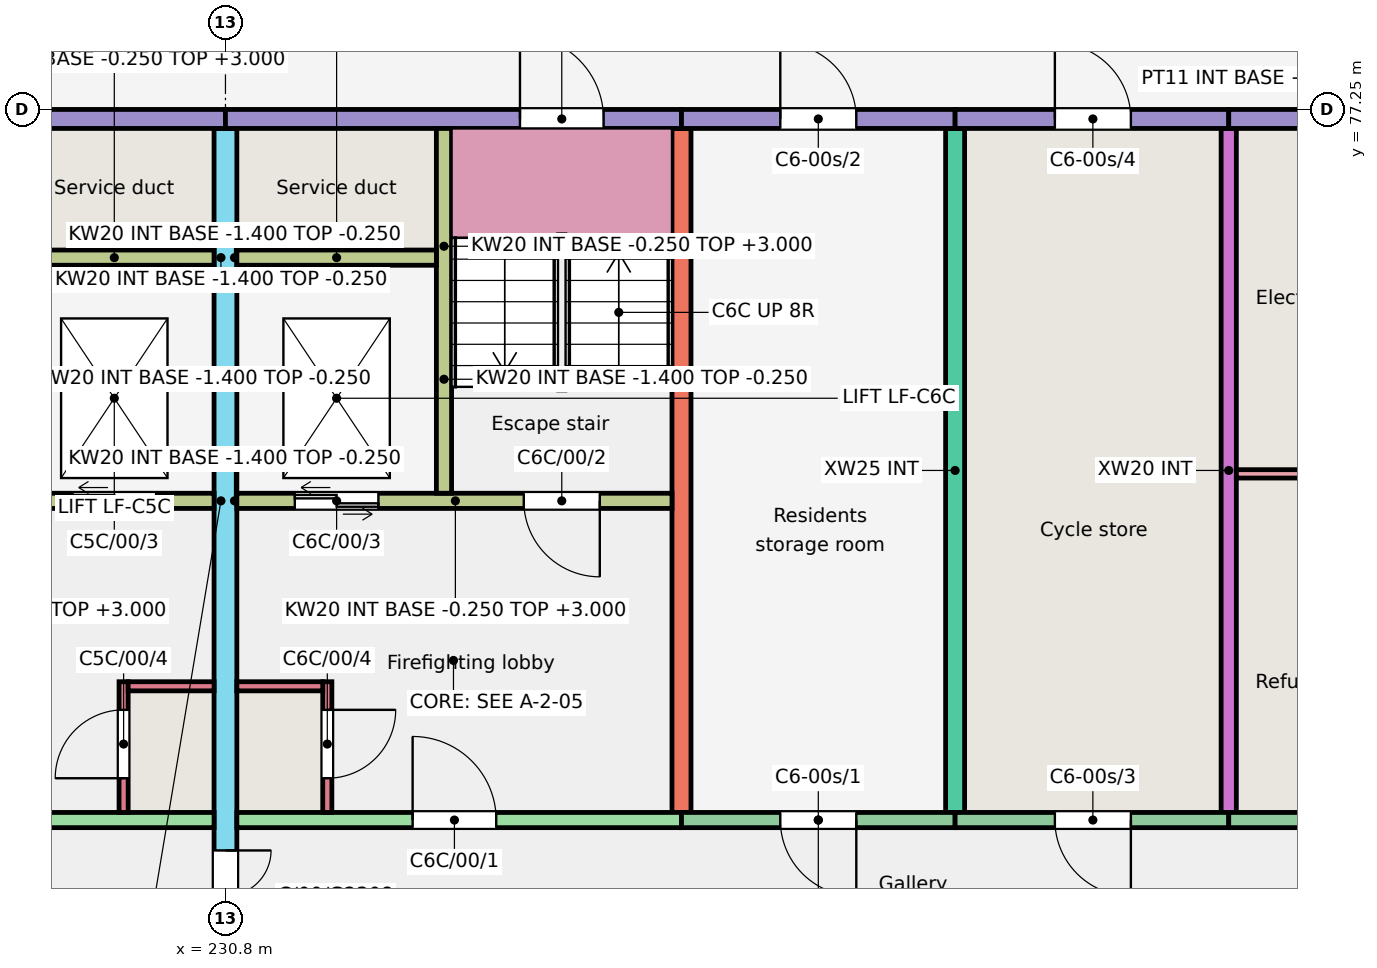
"""IFC4 building model, lengths in metres.
Left out: names, types, materials, properties, quantities, classifications, styles, units other than length and angle.
Written with IfcOpenShell. Run it as: python <this file> out.ifc"""

import sys

from ifc_helpers import new_model, si_unit, direction, frame, frame_2d, origin, place, context, subcontext, project, spatial, rectangle, extrude, element, fill, save


model = new_model("IFC4")
c1 = context("Model", 3, precision=1e-05, world=origin(), true_north=direction((0.0, 1.0)))
c2 = subcontext(c1, "Body", "Model", "MODEL_VIEW")
j1 = project(units=[si_unit("LENGTHUNIT", "METRE"), si_unit("PLANEANGLEUNIT", "RADIAN")], contexts=[c1])
p1 = place(None, origin())
s1 = spatial("IfcSite", under=j1, at=p1, CompositionType="ELEMENT")
p2 = place(p1, origin())
s2 = spatial("IfcBuilding", under=s1, at=p2, CompositionType="ELEMENT")
p3 = place(p2, origin())
s3 = spatial("IfcBuildingStorey", under=s2, at=p3, CompositionType="ELEMENT", Elevation=0.0)
p4 = place(p3, frame((230.8, 66.0, -0.25), z_axis=(0.0, 0.0, 1.0), x_axis=(0.0, 1.0, 0.0)))
e1 = element("IfcWall", 1, at=p4, inside=s3, PredefinedType="SHEAR", context=c2, shape_type="SweptSolid", body=[
    extrude(rectangle(XDim=11.0, YDim=0.3, at=frame_2d((5.5, 0.0))), origin(), (0.0, 0.0, 1.0), 3.25),
])
p5 = place(p4, frame((0.3, 0.0, 0.25)))
e2 = element("IfcOpeningElement", 2, at=p5, cuts=e1, PredefinedType="OPENING", context=c2, shape_type="SweptSolid", body=[
    extrude(rectangle(XDim=1.2, YDim=2.1, at=frame_2d((0.6, 1.05))), frame((0.0, 0.16, 0.0), z_axis=(0.0, -1.0, 0.0), x_axis=(1.0, 0.0, 0.0)), (0.0, 0.0, 1.0), 0.32),
])
for number, where, z_axis, x_axis in (
    (3, (236.8, 68.0, -0.25), (0.0, 0.0, 1.0), (0.0, 1.0, 0.0)),
    (4, (240.4, 68.0, -0.25), (0.0, 0.0, 1.0), (0.0, 1.0, 0.0)),
):
    element("IfcWall", number, at=place(p3, frame(where, z_axis=z_axis, x_axis=x_axis)), inside=s3, PredefinedType="SHEAR", context=c2, shape_type="SweptSolid", body=[
        extrude(rectangle(XDim=9.0, YDim=0.25, at=frame_2d((4.5, 0.0))), origin(), (0.0, 0.0, 1.0), 3.25),
    ])
p6 = place(p3, frame((244.0, 68.0, -0.25), z_axis=(0.0, 0.0, 1.0), x_axis=(0.0, 1.0, 0.0)))
e5 = element("IfcWall", 5, at=p6, inside=s3, PredefinedType="SHEAR", context=c2, shape_type="SweptSolid", body=[
    extrude(rectangle(XDim=9.0, YDim=0.2, at=frame_2d((4.5, 0.0))), origin(), (0.0, 0.0, 1.0), 3.25),
])
p7 = place(p3, frame((224.8, 77.125, -0.25), z_axis=(0.0, 0.0, 1.0), x_axis=(1.0, 0.0, 0.0)))
e6 = element("IfcWall", 6, at=p7, inside=s3, PredefinedType="SOLIDWALL", context=c2, shape_type="SweptSolid", body=[
    extrude(rectangle(XDim=6.0, YDim=0.25, at=frame_2d((3.0, 0.0))), origin(), (0.0, 0.0, 1.0), 3.25),
])
p8 = place(p7, frame((1.025, 0.0, 0.25)))
e7 = element("IfcOpeningElement", 7, at=p8, cuts=e6, PredefinedType="OPENING", context=c2, shape_type="SweptSolid", body=[
    extrude(rectangle(XDim=1.1, YDim=2.1, at=frame_2d((0.55, 1.05))), frame((0.0, 0.135, 0.0), z_axis=(0.0, -1.0, 0.0), x_axis=(1.0, 0.0, 0.0)), (0.0, 0.0, 1.0), 0.27),
])
p9 = place(p3, frame((224.8, 67.9, -0.25), z_axis=(0.0, 0.0, 1.0), x_axis=(1.0, 0.0, 0.0)))
e8 = element("IfcWall", 8, at=p9, inside=s3, PredefinedType="SHEAR", context=c2, shape_type="SweptSolid", body=[
    extrude(rectangle(XDim=5.85, YDim=0.2, at=frame_2d((2.925, 0.0))), origin(), (0.0, 0.0, 1.0), 3.25),
])
p10 = place(p9, frame((2.438, 0.0, 0.25)))
e9 = element("IfcOpeningElement", 9, at=p10, cuts=e8, PredefinedType="OPENING", context=c2, shape_type="SweptSolid", body=[
    extrude(rectangle(XDim=1.1, YDim=2.1, at=frame_2d((0.55, 1.05))), frame((0.0, 0.11, 0.0), z_axis=(0.0, -1.0, 0.0), x_axis=(1.0, 0.0, 0.0)), (0.0, 0.0, 1.0), 0.22),
])
p11 = place(p3, frame((224.925, 72.1, -0.25), z_axis=(0.0, 0.0, 1.0), x_axis=(1.0, 0.0, 0.0)))
e10 = element("IfcWall", 10, at=p11, inside=s3, PredefinedType="SHEAR", context=c2, shape_type="SweptSolid", body=[
    extrude(rectangle(XDim=5.725, YDim=0.2, at=frame_2d((2.862, 0.0))), origin(), (0.0, 0.0, 1.0), 3.25),
])
p12 = place(p11, frame((0.95, 0.0, 0.25)))
e11 = element("IfcOpeningElement", 11, at=p12, cuts=e10, PredefinedType="OPENING", context=c2, shape_type="SweptSolid", body=[
    extrude(rectangle(XDim=1.0, YDim=2.1, at=frame_2d((0.5, 1.05))), frame((0.0, 0.11, 0.0), z_axis=(0.0, -1.0, 0.0), x_axis=(1.0, 0.0, 0.0)), (0.0, 0.0, 1.0), 0.22),
])
p13 = place(p11, frame((3.863, 0.0, 0.25)))
e12 = element("IfcOpeningElement", 12, at=p13, cuts=e10, PredefinedType="OPENING", context=c2, shape_type="SweptSolid", body=[
    extrude(rectangle(XDim=1.1, YDim=2.1, at=frame_2d((0.55, 1.05))), frame((0.0, 0.11, 0.0), z_axis=(0.0, -1.0, 0.0), x_axis=(1.0, 0.0, 0.0)), (0.0, 0.0, 1.0), 0.22),
])
p14 = place(p3, frame((228.025, 75.3, -0.25), z_axis=(0.0, 0.0, 1.0), x_axis=(1.0, 0.0, 0.0)))
e13 = element("IfcWall", 13, at=p14, inside=s3, PredefinedType="SHEAR", context=c2, shape_type="SweptSolid", body=[
    extrude(rectangle(XDim=2.625, YDim=0.2, at=frame_2d((1.312, 0.0))), origin(), (0.0, 0.0, 1.0), 3.25),
])
p15 = place(p3, frame((229.46, 68.0, -0.25), z_axis=(0.0, 0.0, 1.0), x_axis=(0.0, 1.0, 0.0)))
e14 = element("IfcWall", 14, at=p15, inside=s3, PredefinedType="SHEAR", context=c2, shape_type="SweptSolid", body=[
    extrude(rectangle(XDim=1.72, YDim=0.12, at=frame_2d((0.86, 0.0))), origin(), (0.0, 0.0, 1.0), 3.25),
])
p16 = place(p15, frame((0.45, 0.0, 0.25)))
e15 = element("IfcOpeningElement", 15, at=p16, cuts=e14, PredefinedType="OPENING", context=c2, shape_type="SweptSolid", body=[
    extrude(rectangle(XDim=0.9, YDim=2.1, at=frame_2d((0.45, 1.05))), frame((0.0, 0.07, 0.0), z_axis=(0.0, -1.0, 0.0), x_axis=(1.0, 0.0, 0.0)), (0.0, 0.0, 1.0), 0.14),
])
p17 = place(p3, frame((229.52, 69.66, -0.25), z_axis=(0.0, 0.0, 1.0), x_axis=(1.0, 0.0, 0.0)))
e16 = element("IfcWall", 16, at=p17, inside=s3, PredefinedType="SHEAR", context=c2, shape_type="SweptSolid", body=[
    extrude(rectangle(XDim=1.13, YDim=0.12, at=frame_2d((0.565, 0.0))), origin(), (0.0, 0.0, 1.0), 3.25),
])
p18 = place(p3, frame((230.8, 77.125, -0.25), z_axis=(0.0, 0.0, 1.0), x_axis=(1.0, 0.0, 0.0)))
e17 = element("IfcWall", 17, at=p18, inside=s3, PredefinedType="SOLIDWALL", context=c2, shape_type="SweptSolid", body=[
    extrude(rectangle(XDim=6.0, YDim=0.25, at=frame_2d((3.0, 0.0))), origin(), (0.0, 0.0, 1.0), 3.25),
])
p19 = place(p18, frame((3.875, 0.0, 0.25)))
e18 = element("IfcOpeningElement", 18, at=p19, cuts=e17, PredefinedType="OPENING", context=c2, shape_type="SweptSolid", body=[
    extrude(rectangle(XDim=1.1, YDim=2.1, at=frame_2d((0.55, 1.05))), frame((0.0, 0.135, 0.0), z_axis=(0.0, -1.0, 0.0), x_axis=(1.0, 0.0, 0.0)), (0.0, 0.0, 1.0), 0.27),
])
p20 = place(p3, frame((230.95, 67.9, -0.25), z_axis=(0.0, 0.0, 1.0), x_axis=(1.0, 0.0, 0.0)))
e19 = element("IfcWall", 19, at=p20, inside=s3, PredefinedType="SHEAR", context=c2, shape_type="SweptSolid", body=[
    extrude(rectangle(XDim=5.85, YDim=0.2, at=frame_2d((2.925, 0.0))), origin(), (0.0, 0.0, 1.0), 3.25),
])
p21 = place(p20, frame((2.312, 0.0, 0.25)))
e20 = element("IfcOpeningElement", 20, at=p21, cuts=e19, PredefinedType="OPENING", context=c2, shape_type="SweptSolid", body=[
    extrude(rectangle(XDim=1.1, YDim=2.1, at=frame_2d((0.55, 1.05))), frame((0.0, 0.11, 0.0), z_axis=(0.0, -1.0, 0.0), x_axis=(1.0, 0.0, 0.0)), (0.0, 0.0, 1.0), 0.22),
])
p22 = place(p3, frame((230.95, 72.1, -0.25), z_axis=(0.0, 0.0, 1.0), x_axis=(1.0, 0.0, 0.0)))
e21 = element("IfcWall", 21, at=p22, inside=s3, PredefinedType="SHEAR", context=c2, shape_type="SweptSolid", body=[
    extrude(rectangle(XDim=5.725, YDim=0.2, at=frame_2d((2.863, 0.0))), origin(), (0.0, 0.0, 1.0), 3.25),
])
p23 = place(p22, frame((3.775, 0.0, 0.25)))
e22 = element("IfcOpeningElement", 22, at=p23, cuts=e21, PredefinedType="OPENING", context=c2, shape_type="SweptSolid", body=[
    extrude(rectangle(XDim=1.0, YDim=2.1, at=frame_2d((0.5, 1.05))), frame((0.0, 0.11, 0.0), z_axis=(0.0, -1.0, 0.0), x_axis=(1.0, 0.0, 0.0)), (0.0, 0.0, 1.0), 0.22),
])
p24 = place(p22, frame((0.762, 0.0, 0.25)))
e23 = element("IfcOpeningElement", 23, at=p24, cuts=e21, PredefinedType="OPENING", context=c2, shape_type="SweptSolid", body=[
    extrude(rectangle(XDim=1.1, YDim=2.1, at=frame_2d((0.55, 1.05))), frame((0.0, 0.11, 0.0), z_axis=(0.0, -1.0, 0.0), x_axis=(1.0, 0.0, 0.0)), (0.0, 0.0, 1.0), 0.22),
])
p25 = place(p3, frame((233.675, 72.2, -0.25), z_axis=(0.0, 0.0, 1.0), x_axis=(0.0, 1.0, 0.0)))
e24 = element("IfcWall", 24, at=p25, inside=s3, PredefinedType="SHEAR", context=c2, shape_type="SweptSolid", body=[
    extrude(rectangle(XDim=4.8, YDim=0.2, at=frame_2d((2.4, 0.0))), origin(), (0.0, 0.0, 1.0), 3.25),
])
p26 = place(p3, frame((230.95, 75.3, -0.25), z_axis=(0.0, 0.0, 1.0), x_axis=(1.0, 0.0, 0.0)))
e25 = element("IfcWall", 25, at=p26, inside=s3, PredefinedType="SHEAR", context=c2, shape_type="SweptSolid", body=[
    extrude(rectangle(XDim=2.625, YDim=0.2, at=frame_2d((1.312, 0.0))), origin(), (0.0, 0.0, 1.0), 3.25),
])
p27 = place(p3, frame((232.14, 68.0, -0.25), z_axis=(0.0, 0.0, 1.0), x_axis=(0.0, 1.0, 0.0)))
e26 = element("IfcWall", 26, at=p27, inside=s3, PredefinedType="SHEAR", context=c2, shape_type="SweptSolid", body=[
    extrude(rectangle(XDim=1.72, YDim=0.12, at=frame_2d((0.86, 0.0))), origin(), (0.0, 0.0, 1.0), 3.25),
])
p28 = place(p27, frame((0.45, 0.0, 0.25)))
e27 = element("IfcOpeningElement", 27, at=p28, cuts=e26, PredefinedType="OPENING", context=c2, shape_type="SweptSolid", body=[
    extrude(rectangle(XDim=0.9, YDim=2.1, at=frame_2d((0.45, 1.05))), frame((0.0, 0.07, 0.0), z_axis=(0.0, -1.0, 0.0), x_axis=(1.0, 0.0, 0.0)), (0.0, 0.0, 1.0), 0.14),
])
p29 = place(p3, frame((230.95, 69.66, -0.25), z_axis=(0.0, 0.0, 1.0), x_axis=(1.0, 0.0, 0.0)))
e28 = element("IfcWall", 28, at=p29, inside=s3, PredefinedType="SHEAR", context=c2, shape_type="SweptSolid", body=[
    extrude(rectangle(XDim=1.13, YDim=0.12, at=frame_2d((0.565, 0.0))), origin(), (0.0, 0.0, 1.0), 3.25),
])
p30 = place(p3, frame((236.8, 77.125, -0.25), z_axis=(0.0, 0.0, 1.0), x_axis=(1.0, 0.0, 0.0)))
e29 = element("IfcWall", 29, at=p30, inside=s3, PredefinedType="SOLIDWALL", context=c2, shape_type="SweptSolid", body=[
    extrude(rectangle(XDim=3.6, YDim=0.25, at=frame_2d((1.8, 0.0))), origin(), (0.0, 0.0, 1.0), 3.25),
])
p31 = place(p30, frame((1.3, 0.0, 0.25)))
e30 = element("IfcOpeningElement", 30, at=p31, cuts=e29, PredefinedType="OPENING", context=c2, shape_type="SweptSolid", body=[
    extrude(rectangle(XDim=1.0, YDim=2.1, at=frame_2d((0.5, 1.05))), frame((0.0, 0.135, 0.0), z_axis=(0.0, -1.0, 0.0), x_axis=(1.0, 0.0, 0.0)), (0.0, 0.0, 1.0), 0.27),
])
p32 = place(p3, frame((236.8, 67.9, -0.25), z_axis=(0.0, 0.0, 1.0), x_axis=(1.0, 0.0, 0.0)))
e31 = element("IfcWall", 31, at=p32, inside=s3, PredefinedType="SOLIDWALL", context=c2, shape_type="SweptSolid", body=[
    extrude(rectangle(XDim=3.6, YDim=0.2, at=frame_2d((1.8, 0.0))), origin(), (0.0, 0.0, 1.0), 3.25),
])
p33 = place(p32, frame((1.3, 0.0, 0.25)))
e32 = element("IfcOpeningElement", 32, at=p33, cuts=e31, PredefinedType="OPENING", context=c2, shape_type="SweptSolid", body=[
    extrude(rectangle(XDim=1.0, YDim=2.1, at=frame_2d((0.5, 1.05))), frame((0.0, 0.11, 0.0), z_axis=(0.0, -1.0, 0.0), x_axis=(1.0, 0.0, 0.0)), (0.0, 0.0, 1.0), 0.22),
])
p34 = place(p3, frame((240.4, 77.125, -0.25), z_axis=(0.0, 0.0, 1.0), x_axis=(1.0, 0.0, 0.0)))
e33 = element("IfcWall", 33, at=p34, inside=s3, PredefinedType="SOLIDWALL", context=c2, shape_type="SweptSolid", body=[
    extrude(rectangle(XDim=3.6, YDim=0.25, at=frame_2d((1.8, 0.0))), origin(), (0.0, 0.0, 1.0), 3.25),
])
p35 = place(p34, frame((1.312, 0.0, 0.25)))
e34 = element("IfcOpeningElement", 34, at=p35, cuts=e33, PredefinedType="OPENING", context=c2, shape_type="SweptSolid", body=[
    extrude(rectangle(XDim=1.0, YDim=2.1, at=frame_2d((0.5, 1.05))), frame((0.0, 0.135, 0.0), z_axis=(0.0, -1.0, 0.0), x_axis=(1.0, 0.0, 0.0)), (0.0, 0.0, 1.0), 0.27),
])
p36 = place(p3, frame((240.4, 67.9, -0.25), z_axis=(0.0, 0.0, 1.0), x_axis=(1.0, 0.0, 0.0)))
e35 = element("IfcWall", 35, at=p36, inside=s3, PredefinedType="SOLIDWALL", context=c2, shape_type="SweptSolid", body=[
    extrude(rectangle(XDim=3.6, YDim=0.2, at=frame_2d((1.8, 0.0))), origin(), (0.0, 0.0, 1.0), 3.25),
])
p37 = place(p36, frame((1.312, 0.0, 0.25)))
e36 = element("IfcOpeningElement", 36, at=p37, cuts=e35, PredefinedType="OPENING", context=c2, shape_type="SweptSolid", body=[
    extrude(rectangle(XDim=1.0, YDim=2.1, at=frame_2d((0.5, 1.05))), frame((0.0, 0.11, 0.0), z_axis=(0.0, -1.0, 0.0), x_axis=(1.0, 0.0, 0.0)), (0.0, 0.0, 1.0), 0.22),
])
p38 = place(p3, frame((244.0, 77.125, -0.25), z_axis=(0.0, 0.0, 1.0), x_axis=(1.0, 0.0, 0.0)))
e37 = element("IfcWall", 37, at=p38, inside=s3, PredefinedType="SOLIDWALL", context=c2, shape_type="SweptSolid", body=[
    extrude(rectangle(XDim=3.75, YDim=0.25, at=frame_2d((1.875, 0.0))), origin(), (0.0, 0.0, 1.0), 3.25),
])
p39 = place(p3, frame((244.0, 67.9, -0.25), z_axis=(0.0, 0.0, 1.0), x_axis=(1.0, 0.0, 0.0)))
e38 = element("IfcWall", 38, at=p39, inside=s3, PredefinedType="SOLIDWALL", context=c2, shape_type="SweptSolid", body=[
    extrude(rectangle(XDim=3.45, YDim=0.2, at=frame_2d((1.725, 0.0))), origin(), (0.0, 0.0, 1.0), 3.25),
])
p40 = place(p39, frame((1.275, 0.0, 0.25)))
e39 = element("IfcOpeningElement", 39, at=p40, cuts=e38, PredefinedType="OPENING", context=c2, shape_type="SweptSolid", body=[
    extrude(rectangle(XDim=1.0, YDim=2.1, at=frame_2d((0.5, 1.05))), frame((0.0, 0.11, 0.0), z_axis=(0.0, -1.0, 0.0), x_axis=(1.0, 0.0, 0.0)), (0.0, 0.0, 1.0), 0.22),
])
for number, where, z_axis, x_axis in (
    (40, (227.825, 72.1, -1.4), (0.0, 0.0, 1.0), (1.0, 0.0, 0.0)),
    (41, (227.825, 75.3, -1.4), (0.0, 0.0, 1.0), (1.0, 0.0, 0.0)),
):
    element("IfcWall", number, at=place(p3, frame(where, z_axis=z_axis, x_axis=x_axis)), inside=s3, PredefinedType="SHEAR", context=c2, shape_type="SweptSolid", body=[
        extrude(rectangle(XDim=2.975, YDim=0.2, at=frame_2d((1.488, 0.0))), origin(), (0.0, 0.0, 1.0), 1.15),
    ])
p41 = place(p3, frame((230.725, 72.2, -1.4), z_axis=(0.0, 0.0, 1.0), x_axis=(0.0, 1.0, 0.0)))
e42 = element("IfcWall", 42, at=p41, inside=s3, PredefinedType="SHEAR", context=c2, shape_type="SweptSolid", body=[
    extrude(rectangle(XDim=3.0, YDim=0.15, at=frame_2d((1.5, 0.0))), origin(), (0.0, 0.0, 1.0), 1.15),
])
for number, where, z_axis, x_axis in (
    (43, (230.8, 72.1, -1.4), (0.0, 0.0, 1.0), (1.0, 0.0, 0.0)),
    (44, (230.8, 75.3, -1.4), (0.0, 0.0, 1.0), (1.0, 0.0, 0.0)),
):
    element("IfcWall", number, at=place(p3, frame(where, z_axis=z_axis, x_axis=x_axis)), inside=s3, PredefinedType="SHEAR", context=c2, shape_type="SweptSolid", body=[
        extrude(rectangle(XDim=2.975, YDim=0.2, at=frame_2d((1.487, 0.0))), origin(), (0.0, 0.0, 1.0), 1.15),
    ])
p42 = place(p3, frame((233.675, 72.2, -1.4), z_axis=(0.0, 0.0, 1.0), x_axis=(0.0, 1.0, 0.0)))
e45 = element("IfcWall", 45, at=p42, inside=s3, PredefinedType="SHEAR", context=c2, shape_type="SweptSolid", body=[
    extrude(rectangle(XDim=3.0, YDim=0.2, at=frame_2d((1.5, 0.0))), origin(), (0.0, 0.0, 1.0), 1.15),
])
p43 = place(p3, frame((230.875, 72.2, -1.4), z_axis=(0.0, 0.0, 1.0), x_axis=(0.0, 1.0, 0.0)))
e46 = element("IfcWall", 46, at=p43, inside=s3, PredefinedType="SHEAR", context=c2, shape_type="SweptSolid", body=[
    extrude(rectangle(XDim=3.0, YDim=0.15, at=frame_2d((1.5, 0.0))), origin(), (0.0, 0.0, 1.0), 1.15),
])
p44 = place(p3, frame((244.1, 72.455, 0.0), z_axis=(0.0, 0.0, 1.0), x_axis=(1.0, 0.0, 0.0)))
e47 = element("IfcWall", 47, at=p44, inside=s3, PredefinedType="PARTITIONING", context=c2, shape_type="SweptSolid", body=[
    extrude(rectangle(XDim=3.35, YDim=0.11, at=frame_2d((1.675, 0.0))), origin(), (0.0, 0.0, 1.0), 2.8),
])
p45 = place(p44, frame((1.225, 0.0, 0.0)))
e48 = element("IfcOpeningElement", 48, at=p45, cuts=e47, PredefinedType="OPENING", context=c2, shape_type="SweptSolid", body=[
    extrude(rectangle(XDim=0.9, YDim=2.1, at=frame_2d((0.45, 1.05))), frame((0.0, 0.065, 0.0), z_axis=(0.0, -1.0, 0.0), x_axis=(1.0, 0.0, 0.0)), (0.0, 0.0, 1.0), 0.13),
])
p46 = place(p33, origin())
e49 = element("IfcDoor", 49, at=p46, inside=s3, OperationType="SINGLE_SWING_RIGHT", PredefinedType="DOOR", context=c2, shape_type="SweptSolid", body=[
    extrude(rectangle(XDim=1.0, YDim=2.1, at=frame_2d((0.5, 1.05))), frame((0.0, 0.025, 0.0), z_axis=(0.0, -1.0, 0.0), x_axis=(1.0, 0.0, 0.0)), (0.0, 0.0, 1.0), 0.05),
])
fill(e32, e49)
p47 = place(p31, origin())
e50 = element("IfcDoor", 50, at=p47, inside=s3, OperationType="SINGLE_SWING_LEFT", PredefinedType="DOOR", context=c2, shape_type="SweptSolid", body=[
    extrude(rectangle(XDim=1.0, YDim=2.1, at=frame_2d((0.5, 1.05))), frame((0.0, 0.025, 0.0), z_axis=(0.0, -1.0, 0.0), x_axis=(1.0, 0.0, 0.0)), (0.0, 0.0, 1.0), 0.05),
])
fill(e30, e50)
p48 = place(p37, origin())
e51 = element("IfcDoor", 51, at=p48, inside=s3, OperationType="SINGLE_SWING_RIGHT", PredefinedType="DOOR", context=c2, shape_type="SweptSolid", body=[
    extrude(rectangle(XDim=1.0, YDim=2.1, at=frame_2d((0.5, 1.05))), frame((0.0, 0.025, 0.0), z_axis=(0.0, -1.0, 0.0), x_axis=(1.0, 0.0, 0.0)), (0.0, 0.0, 1.0), 0.05),
])
fill(e36, e51)
p49 = place(p35, origin())
e52 = element("IfcDoor", 52, at=p49, inside=s3, OperationType="SINGLE_SWING_LEFT", PredefinedType="DOOR", context=c2, shape_type="SweptSolid", body=[
    extrude(rectangle(XDim=1.0, YDim=2.1, at=frame_2d((0.5, 1.05))), frame((0.0, 0.025, 0.0), z_axis=(0.0, -1.0, 0.0), x_axis=(1.0, 0.0, 0.0)), (0.0, 0.0, 1.0), 0.05),
])
fill(e34, e52)
p50 = place(p13, origin())
e53 = element("IfcDoor", 53, at=p50, inside=s3, OperationType="DOUBLE_DOOR_SLIDING", PredefinedType="DOOR", context=c2, shape_type="SweptSolid", body=[
    extrude(rectangle(XDim=1.1, YDim=2.1, at=frame_2d((0.55, 1.05))), frame((0.0, 0.025, 0.0), z_axis=(0.0, -1.0, 0.0), x_axis=(1.0, 0.0, 0.0)), (0.0, 0.0, 1.0), 0.05),
])
fill(e12, e53)
p51 = place(p16, origin())
e54 = element("IfcDoor", 54, at=p51, inside=s3, OperationType="SINGLE_SWING_LEFT", PredefinedType="DOOR", context=c2, shape_type="SweptSolid", body=[
    extrude(rectangle(XDim=0.9, YDim=2.1, at=frame_2d((0.45, 1.05))), frame((0.0, 0.025, 0.0), z_axis=(0.0, -1.0, 0.0), x_axis=(1.0, 0.0, 0.0)), (0.0, 0.0, 1.0), 0.05),
])
fill(e15, e54)
p52 = place(p21, origin())
e55 = element("IfcDoor", 55, at=p52, inside=s3, OperationType="SINGLE_SWING_LEFT", PredefinedType="DOOR", context=c2, shape_type="SweptSolid", body=[
    extrude(rectangle(XDim=1.1, YDim=2.1, at=frame_2d((0.55, 1.05))), frame((0.0, 0.025, 0.0), z_axis=(0.0, -1.0, 0.0), x_axis=(1.0, 0.0, 0.0)), (0.0, 0.0, 1.0), 0.05),
])
fill(e20, e55)
p53 = place(p23, origin())
e56 = element("IfcDoor", 56, at=p53, inside=s3, OperationType="SINGLE_SWING_RIGHT", PredefinedType="DOOR", context=c2, shape_type="SweptSolid", body=[
    extrude(rectangle(XDim=1.0, YDim=2.1, at=frame_2d((0.5, 1.05))), frame((0.0, 0.025, 0.0), z_axis=(0.0, -1.0, 0.0), x_axis=(1.0, 0.0, 0.0)), (0.0, 0.0, 1.0), 0.05),
])
fill(e22, e56)
p54 = place(p24, origin())
e57 = element("IfcDoor", 57, at=p54, inside=s3, OperationType="DOUBLE_DOOR_SLIDING", PredefinedType="DOOR", context=c2, shape_type="SweptSolid", body=[
    extrude(rectangle(XDim=1.1, YDim=2.1, at=frame_2d((0.55, 1.05))), frame((0.0, 0.025, 0.0), z_axis=(0.0, -1.0, 0.0), x_axis=(1.0, 0.0, 0.0)), (0.0, 0.0, 1.0), 0.05),
])
fill(e23, e57)
p55 = place(p28, origin())
e58 = element("IfcDoor", 58, at=p55, inside=s3, OperationType="SINGLE_SWING_RIGHT", PredefinedType="DOOR", context=c2, shape_type="SweptSolid", body=[
    extrude(rectangle(XDim=0.9, YDim=2.1, at=frame_2d((0.45, 1.05))), frame((0.0, 0.025, 0.0), z_axis=(0.0, -1.0, 0.0), x_axis=(1.0, 0.0, 0.0)), (0.0, 0.0, 1.0), 0.05),
])
fill(e27, e58)
p56 = place(p19, origin())
e59 = element("IfcDoor", 59, at=p56, inside=s3, OperationType="SINGLE_SWING_LEFT", PredefinedType="DOOR", context=c2, shape_type="SweptSolid", body=[
    extrude(rectangle(XDim=1.1, YDim=2.1, at=frame_2d((0.55, 1.05))), frame((0.0, 0.025, 0.0), z_axis=(0.0, -1.0, 0.0), x_axis=(1.0, 0.0, 0.0)), (0.0, 0.0, 1.0), 0.05),
])
fill(e18, e59)
p57 = place(p5, origin())
e60 = element("IfcDoor", 60, at=p57, inside=s3, OperationType="DOUBLE_DOOR_SINGLE_SWING", PredefinedType="DOOR", context=c2, shape_type="SweptSolid", body=[
    extrude(rectangle(XDim=1.2, YDim=2.1, at=frame_2d((0.6, 1.05))), frame((0.0, 0.025, 0.0), z_axis=(0.0, -1.0, 0.0), x_axis=(1.0, 0.0, 0.0)), (0.0, 0.0, 1.0), 0.05),
])
fill(e2, e60)
save(model, sys.argv[1])
